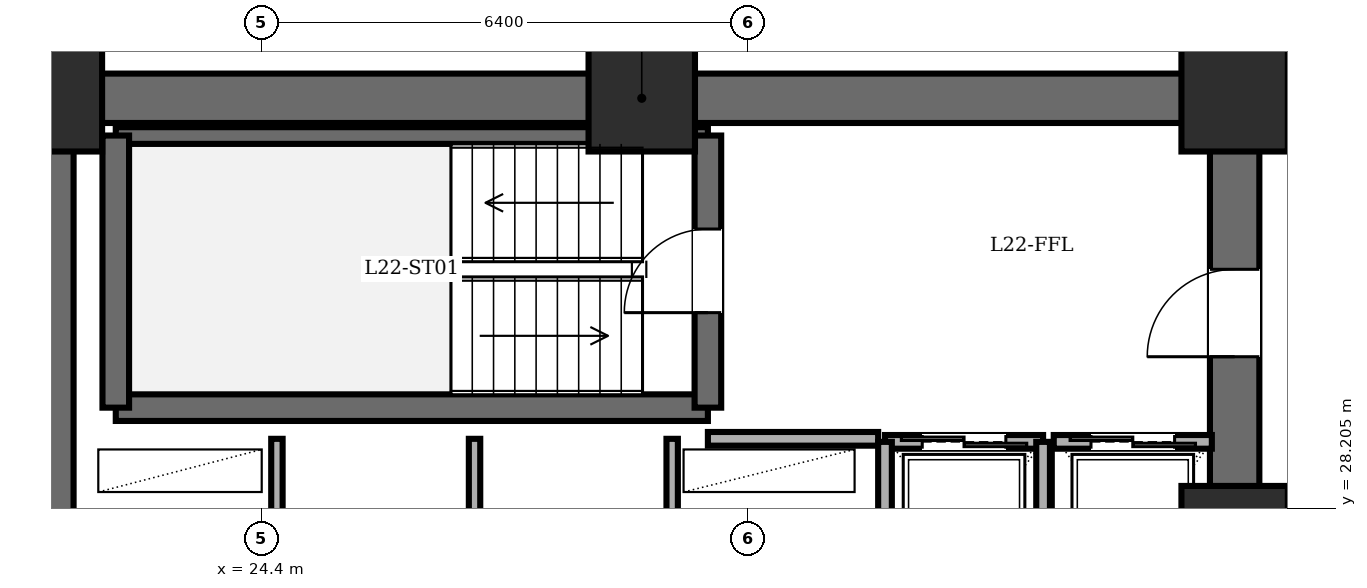
"""IFC4 building model, lengths in metres.
Left out: names, types, materials, properties, quantities, classifications, styles, units other than length and angle.
Written with IfcOpenShell. Run it as: python <this file> out.ifc"""

import sys

from ifc_helpers import new_model, si_unit, direction, frame, frame_2d, origin, origin_2d, place, context, subcontext, project, spatial, rectangle, extrude, element, fill, save


model = new_model("IFC4")
c1 = context("Model", 3, precision=1e-05, world=origin(), true_north=direction((0.0, 1.0)))
c2 = subcontext(c1, "Body", "Model", "MODEL_VIEW")
j1 = project(units=[si_unit("LENGTHUNIT", "METRE"), si_unit("PLANEANGLEUNIT", "RADIAN")], contexts=[c1])
p1 = place(None, origin())
s1 = spatial("IfcSite", under=j1, at=p1, CompositionType="ELEMENT")
p2 = place(p1, origin())
s2 = spatial("IfcBuilding", under=s1, at=p2, CompositionType="ELEMENT")
p3 = place(p2, frame((0.0, 0.0, 86.3)))
s3 = spatial("IfcBuildingStorey", under=s2, at=p3, CompositionType="ELEMENT", Elevation=86.3)
for number, where, z_axis, x_axis in (
    (1, (37.2, 27.8, 0.0), (0.0, 0.0, 1.0), (1.0, 0.0, 0.0)),
    (2, (37.2, 33.6, 0.0), (0.0, 0.0, 1.0), (1.0, 0.0, 0.0)),
    (3, (29.4, 33.6, 0.0), (0.0, 0.0, 1.0), (1.0, 0.0, 0.0)),
    (4, (21.6, 33.6, 0.0), (0.0, 0.0, 1.0), (1.0, 0.0, 0.0)),
):
    element("IfcColumn", number, at=place(p3, frame(where, z_axis=z_axis, x_axis=x_axis)), inside=s3, PredefinedType="COLUMN", context=c2, shape_type="SweptSolid", body=[
        extrude(rectangle(XDim=1.4, YDim=1.4, at=origin_2d()), origin(), (0.0, 0.0, 1.0), 3.6),
    ])
p4 = place(p3, frame((21.6, 14.4, 0.0), z_axis=(0.0, 0.0, 1.0), x_axis=(0.0, 1.0, 0.0)))
e5 = element("IfcWall", 5, at=p4, inside=s3, PredefinedType="SHEAR", context=c2, shape_type="SweptSolid", body=[
    extrude(rectangle(XDim=19.2, YDim=0.65, at=frame_2d((9.6, 0.0))), origin(), (0.0, 0.0, 1.0), 3.4),
])
p5 = place(p3, frame((21.6, 33.6, 0.0), z_axis=(0.0, 0.0, 1.0), x_axis=(1.0, 0.0, 0.0)))
e6 = element("IfcWall", 6, at=p5, inside=s3, PredefinedType="SHEAR", context=c2, shape_type="SweptSolid", body=[
    extrude(rectangle(XDim=15.6, YDim=0.65, at=frame_2d((7.8, 0.0))), origin(), (0.0, 0.0, 1.0), 3.4),
])
p6 = place(p3, frame((37.2, 14.4, 0.0), z_axis=(0.0, 0.0, 1.0), x_axis=(0.0, 1.0, 0.0)))
e7 = element("IfcWall", 7, at=p6, inside=s3, PredefinedType="SHEAR", context=c2, shape_type="SweptSolid", body=[
    extrude(rectangle(XDim=19.2, YDim=0.65, at=frame_2d((9.6, 0.0))), origin(), (0.0, 0.0, 1.0), 3.4),
])
p7 = place(p6, frame((15.8, 0.0, 0.0)))
e8 = element("IfcOpeningElement", 8, at=p7, cuts=e7, PredefinedType="OPENING", context=c2, shape_type="SweptSolid", body=[
    extrude(rectangle(XDim=1.15, YDim=2.15, at=frame_2d((0.575, 1.075))), frame((0.0, 0.335, 0.0), z_axis=(0.0, -1.0, 0.0), x_axis=(1.0, 0.0, 0.0)), (0.0, 0.0, 1.0), 0.67),
])
p8 = place(p6, frame((3.6, 0.0, 0.0)))
e9 = element("IfcOpeningElement", 9, at=p8, cuts=e7, PredefinedType="OPENING", context=c2, shape_type="SweptSolid", body=[
    extrude(rectangle(XDim=1.1, YDim=2.15, at=frame_2d((0.55, 1.075))), frame((0.0, 0.335, 0.0), z_axis=(0.0, -1.0, 0.0), x_axis=(1.0, 0.0, 0.0)), (0.0, 0.0, 1.0), 0.67),
])
p9 = place(p6, frame((8.6, 0.0, 0.0)))
e10 = element("IfcOpeningElement", 10, at=p9, cuts=e7, PredefinedType="OPENING", context=c2, shape_type="SweptSolid", body=[
    extrude(rectangle(XDim=1.3, YDim=2.2, at=frame_2d((0.65, 1.1))), frame((0.0, 0.335, 0.0), z_axis=(0.0, -1.0, 0.0), x_axis=(1.0, 0.0, 0.0)), (0.0, 0.0, 1.0), 0.67),
])
p10 = place(p3, frame((22.48, 29.53, 0.0), z_axis=(0.0, 0.0, 1.0), x_axis=(1.0, 0.0, 0.0)))
e11 = element("IfcWall", 11, at=p10, inside=s3, PredefinedType="SOLIDWALL", context=c2, shape_type="SweptSolid", body=[
    extrude(rectangle(XDim=7.79, YDim=0.35, at=frame_2d((3.895, 0.0))), origin(), (0.0, 0.0, 1.0), 3.4),
])
p11 = place(p3, frame((22.48, 33.11, 0.0), z_axis=(0.0, 0.0, 1.0), x_axis=(1.0, 0.0, 0.0)))
e12 = element("IfcWall", 12, at=p11, inside=s3, PredefinedType="PARTITIONING", context=c2, shape_type="SweptSolid", body=[
    extrude(rectangle(XDim=7.79, YDim=0.22, at=frame_2d((3.895, 0.0))), origin(), (0.0, 0.0, 1.0), 3.4),
])
p12 = place(p3, frame((22.48, 29.53, 0.0), z_axis=(0.0, 0.0, 1.0), x_axis=(0.0, 1.0, 0.0)))
e13 = element("IfcWall", 13, at=p12, inside=s3, PredefinedType="SOLIDWALL", context=c2, shape_type="SweptSolid", body=[
    extrude(rectangle(XDim=3.58, YDim=0.35, at=frame_2d((1.79, 0.0))), origin(), (0.0, 0.0, 1.0), 3.4),
])
p13 = place(p3, frame((30.27, 29.53, 0.0), z_axis=(0.0, 0.0, 1.0), x_axis=(0.0, 1.0, 0.0)))
e14 = element("IfcWall", 14, at=p13, inside=s3, PredefinedType="SOLIDWALL", context=c2, shape_type="SweptSolid", body=[
    extrude(rectangle(XDim=3.58, YDim=0.35, at=frame_2d((1.79, 0.0))), origin(), (0.0, 0.0, 1.0), 3.4),
])
p14 = place(p13, frame((1.25, 0.0, 0.0)))
e15 = element("IfcOpeningElement", 15, at=p14, cuts=e14, PredefinedType="OPENING", context=c2, shape_type="SweptSolid", body=[
    extrude(rectangle(XDim=1.1, YDim=2.15, at=frame_2d((0.55, 1.075))), frame((0.0, 0.185, 0.0), z_axis=(0.0, -1.0, 0.0), x_axis=(1.0, 0.0, 0.0)), (0.0, 0.0, 1.0), 0.37),
])
p15 = place(p3, frame((30.27, 29.12, 0.0), z_axis=(0.0, 0.0, 1.0), x_axis=(1.0, 0.0, 0.0)))
e16 = element("IfcWall", 16, at=p15, inside=s3, PredefinedType="PARTITIONING", context=c2, shape_type="SweptSolid", body=[
    extrude(rectangle(XDim=2.24, YDim=0.18, at=frame_2d((1.12, 0.0))), origin(), (0.0, 0.0, 1.0), 3.4),
])
for number, where, z_axis, x_axis in (
    (17, (24.6, 27.6, 0.0), (0.0, 0.0, 1.0), (0.0, 1.0, 0.0)),
    (18, (27.2, 27.6, 0.0), (0.0, 0.0, 1.0), (0.0, 1.0, 0.0)),
    (19, (29.8, 27.6, 0.0), (0.0, 0.0, 1.0), (0.0, 1.0, 0.0)),
):
    element("IfcWall", number, at=place(p3, frame(where, z_axis=z_axis, x_axis=x_axis)), inside=s3, PredefinedType="PARTITIONING", context=c2, shape_type="SweptSolid", body=[
        extrude(rectangle(XDim=1.52, YDim=0.15, at=frame_2d((0.76, 0.0))), origin(), (0.0, 0.0, 1.0), 3.4),
    ])
p16 = place(p3, frame((32.6, 29.08, 0.0), z_axis=(0.0, 0.0, 1.0), x_axis=(1.0, 0.0, 0.0)))
e20 = element("IfcWall", 20, at=p16, inside=s3, PredefinedType="PARTITIONING", context=c2, shape_type="SweptSolid", body=[
    extrude(rectangle(XDim=2.08, YDim=0.18, at=frame_2d((1.04, 0.0))), origin(), (0.0, 0.0, 1.0), 3.4),
])
p17 = place(p16, frame((0.49, 0.0, 0.0)))
e21 = element("IfcOpeningElement", 21, at=p17, cuts=e20, PredefinedType="OPENING", context=c2, shape_type="SweptSolid", body=[
    extrude(rectangle(XDim=1.1, YDim=2.2, at=frame_2d((0.55, 1.1))), frame((0.0, 0.1, 0.0), z_axis=(0.0, -1.0, 0.0), x_axis=(1.0, 0.0, 0.0)), (0.0, 0.0, 1.0), 0.2),
])
for number, where, z_axis, x_axis in (
    (22, (34.68, 26.35, 0.0), (0.0, 0.0, 1.0), (0.0, 1.0, 0.0)),
    (23, (32.6, 29.08, 0.0), (0.0, 0.0, 1.0), (0.0, -1.0, 0.0)),
):
    element("IfcWall", number, at=place(p3, frame(where, z_axis=z_axis, x_axis=x_axis)), inside=s3, PredefinedType="PARTITIONING", context=c2, shape_type="SweptSolid", body=[
        extrude(rectangle(XDim=2.73, YDim=0.18, at=frame_2d((1.365, 0.0))), origin(), (0.0, 0.0, 1.0), 3.4),
    ])
p18 = place(p3, frame((34.82, 29.08, 0.0), z_axis=(0.0, 0.0, 1.0), x_axis=(1.0, 0.0, 0.0)))
e24 = element("IfcWall", 24, at=p18, inside=s3, PredefinedType="PARTITIONING", context=c2, shape_type="SweptSolid", body=[
    extrude(rectangle(XDim=2.08, YDim=0.18, at=frame_2d((1.04, 0.0))), origin(), (0.0, 0.0, 1.0), 3.4),
])
p19 = place(p18, frame((0.49, 0.0, 0.0)))
e25 = element("IfcOpeningElement", 25, at=p19, cuts=e24, PredefinedType="OPENING", context=c2, shape_type="SweptSolid", body=[
    extrude(rectangle(XDim=1.1, YDim=2.2, at=frame_2d((0.55, 1.1))), frame((0.0, 0.1, 0.0), z_axis=(0.0, -1.0, 0.0), x_axis=(1.0, 0.0, 0.0)), (0.0, 0.0, 1.0), 0.2),
])
p20 = place(p14, origin())
e26 = element("IfcDoor", 26, at=p20, inside=s3, OperationType="SINGLE_SWING_LEFT", PredefinedType="DOOR", context=c2, shape_type="SweptSolid", body=[
    extrude(rectangle(XDim=1.1, YDim=2.15, at=frame_2d((0.55, 1.075))), frame((0.0, 0.025, 0.0), z_axis=(0.0, -1.0, 0.0), x_axis=(1.0, 0.0, 0.0)), (0.0, 0.0, 1.0), 0.05),
])
fill(e15, e26)
p21 = place(p7, origin())
e27 = element("IfcDoor", 27, at=p21, inside=s3, OperationType="SINGLE_SWING_LEFT", PredefinedType="DOOR", context=c2, shape_type="SweptSolid", body=[
    extrude(rectangle(XDim=1.15, YDim=2.15, at=frame_2d((0.575, 1.075))), frame((0.0, 0.025, 0.0), z_axis=(0.0, -1.0, 0.0), x_axis=(1.0, 0.0, 0.0)), (0.0, 0.0, 1.0), 0.05),
])
fill(e8, e27)
p22 = place(p17, origin())
e28 = element("IfcDoor", 28, at=p22, inside=s3, OperationType="DOUBLE_DOOR_SLIDING", PredefinedType="DOOR", context=c2, shape_type="SweptSolid", body=[
    extrude(rectangle(XDim=1.1, YDim=2.2, at=frame_2d((0.55, 1.1))), frame((0.0, 0.025, 0.0), z_axis=(0.0, -1.0, 0.0), x_axis=(1.0, 0.0, 0.0)), (0.0, 0.0, 1.0), 0.05),
])
fill(e21, e28)
p23 = place(p19, origin())
e29 = element("IfcDoor", 29, at=p23, inside=s3, OperationType="DOUBLE_DOOR_SLIDING", PredefinedType="DOOR", context=c2, shape_type="SweptSolid", body=[
    extrude(rectangle(XDim=1.1, YDim=2.2, at=frame_2d((0.55, 1.1))), frame((0.0, 0.025, 0.0), z_axis=(0.0, -1.0, 0.0), x_axis=(1.0, 0.0, 0.0)), (0.0, 0.0, 1.0), 0.05),
])
fill(e25, e29)
save(model, sys.argv[1])
